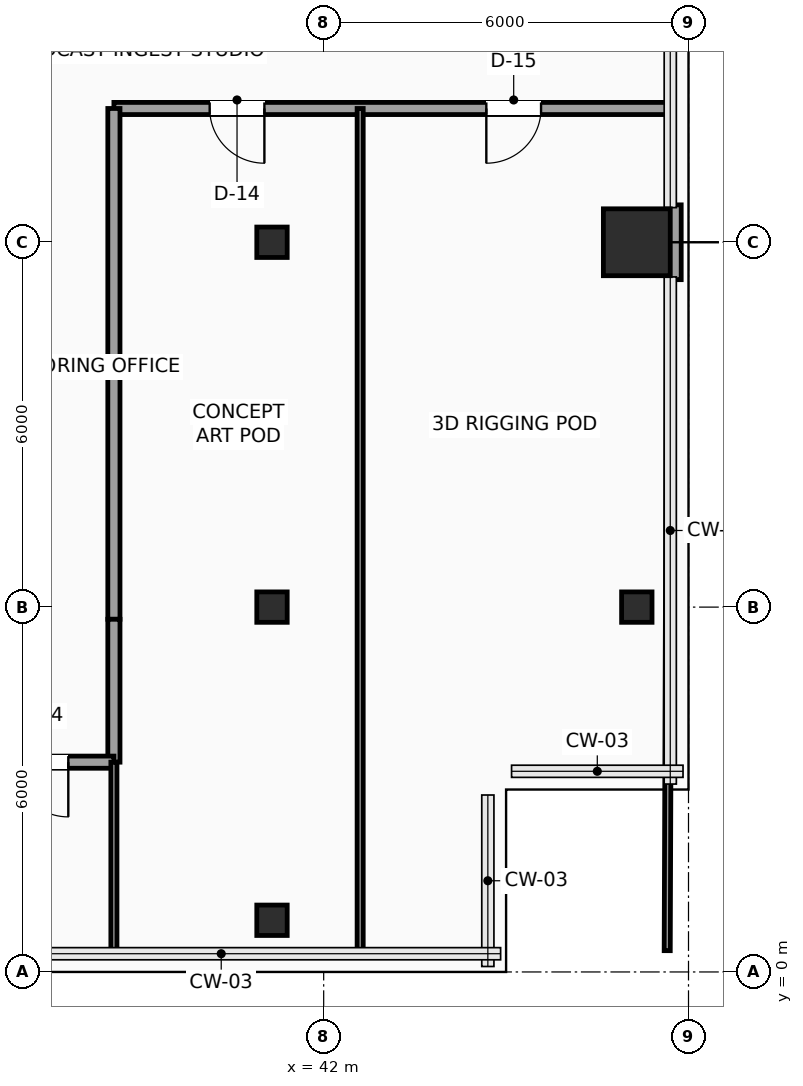
"""IFC4 building model, lengths in metres.
Left out: names, types, materials, properties, quantities, classifications, styles, units other than length and angle.
Written with IfcOpenShell. Run it as: python <this file> out.ifc"""

import sys

from ifc_helpers import new_model, si_unit, direction, frame, frame_2d, origin, origin_2d, place, context, subcontext, project, spatial, rectangle, hollow_rectangle, extrude, element, fill, save


model = new_model("IFC4")
c1 = context("Model", 3, precision=1e-05, world=origin(), true_north=direction((0.0, 1.0)))
c2 = subcontext(c1, "Body", "Model", "MODEL_VIEW")
j1 = project(units=[si_unit("LENGTHUNIT", "METRE"), si_unit("PLANEANGLEUNIT", "RADIAN")], contexts=[c1])
p1 = place(None, origin())
s1 = spatial("IfcSite", under=j1, at=p1, CompositionType="ELEMENT")
p2 = place(p1, origin())
s2 = spatial("IfcBuilding", under=s1, at=p2, CompositionType="ELEMENT")
p3 = place(p2, frame((0.0, 0.0, 145.65)))
s3 = spatial("IfcBuildingStorey", under=s2, at=p3, CompositionType="ELEMENT", Elevation=145.65)
for number, where, z_axis, x_axis in (
    (1, (41.15, 0.85, 0.0), (0.0, 0.0, 1.0), (1.0, 0.0, 0.0)),
    (2, (41.15, 6.0, 0.0), (0.0, 0.0, 1.0), (1.0, 0.0, 0.0)),
    (3, (41.15, 12.0, 0.0), (0.0, 0.0, 1.0), (1.0, 0.0, 0.0)),
    (4, (47.15, 6.0, 0.0), (0.0, 0.0, 1.0), (1.0, 0.0, 0.0)),
):
    element("IfcColumn", number, at=place(p3, frame(where, z_axis=z_axis, x_axis=x_axis)), inside=s3, PredefinedType="COLUMN", context=c2, shape_type="SweptSolid", body=[
        extrude(hollow_rectangle(XDim=0.5, YDim=0.5, WallThickness=0.025, InnerFilletRadius=0.025, OuterFilletRadius=0.04, at=origin_2d()), origin(), (0.0, 0.0, 1.0), 3.75),
    ])
p4 = place(p3, frame((47.15, 12.0, 0.0), z_axis=(0.0, 0.0, 1.0), x_axis=(1.0, 0.0, 0.0)))
e5 = element("IfcColumn", 5, at=p4, inside=s3, PredefinedType="COLUMN", context=c2, shape_type="SweptSolid", body=[
    extrude(rectangle(XDim=1.1, YDim=1.1, at=origin_2d()), origin(), (0.0, 0.0, 1.0), 3.75),
])
p5 = place(p3, frame((47.76, 12.615, 0.0), z_axis=(0.0, 0.0, 1.0), x_axis=(0.0, -1.0, 0.0)))
e6 = element("IfcWall", 6, at=p5, inside=s3, PredefinedType="SOLIDWALL", context=c2, shape_type="SweptSolid", body=[
    extrude(rectangle(XDim=1.23, YDim=0.24, at=frame_2d((0.615, 0.0))), origin(), (0.0, 0.0, 1.0), 3.525),
])
p6 = place(p3, frame((47.7, 14.2, 0.0), z_axis=(0.0, 0.0, 1.0), x_axis=(-1.0, 0.0, 0.0)))
e7 = element("IfcWall", 7, at=p6, inside=s3, PredefinedType="PARTITIONING", context=c2, shape_type="SweptSolid", body=[
    extrude(rectangle(XDim=9.15, YDim=0.2, at=frame_2d((4.575, 0.0))), origin(), (0.0, 0.0, 1.0), 3.525),
])
p7 = place(p6, frame((6.675, 0.0, 0.0)))
e8 = element("IfcOpeningElement", 8, at=p7, cuts=e7, PredefinedType="OPENING", context=c2, shape_type="SweptSolid", body=[
    extrude(rectangle(XDim=0.9, YDim=2.1, at=frame_2d((0.45, 1.05))), frame((0.0, 0.11, 0.0), z_axis=(0.0, -1.0, 0.0), x_axis=(1.0, 0.0, 0.0)), (0.0, 0.0, 1.0), 0.22),
])
p8 = place(p6, frame((2.125, 0.0, 0.0)))
e9 = element("IfcOpeningElement", 9, at=p8, cuts=e7, PredefinedType="OPENING", context=c2, shape_type="SweptSolid", body=[
    extrude(rectangle(XDim=0.9, YDim=2.1, at=frame_2d((0.45, 1.05))), frame((0.0, 0.11, 0.0), z_axis=(0.0, -1.0, 0.0), x_axis=(1.0, 0.0, 0.0)), (0.0, 0.0, 1.0), 0.22),
])
p9 = place(p3, frame((38.55, 14.2, 0.0), z_axis=(0.0, 0.0, 1.0), x_axis=(0.0, -1.0, 0.0)))
e10 = element("IfcWall", 10, at=p9, inside=s3, PredefinedType="PARTITIONING", context=c2, shape_type="SweptSolid", body=[
    extrude(rectangle(XDim=8.4, YDim=0.2, at=frame_2d((4.2, 0.0))), origin(), (0.0, 0.0, 1.0), 3.525),
])
p10 = place(p3, frame((38.55, 5.8, 0.0), z_axis=(0.0, 0.0, 1.0), x_axis=(0.0, -1.0, 0.0)))
e11 = element("IfcWall", 11, at=p10, inside=s3, PredefinedType="PARTITIONING", context=c2, shape_type="SweptSolid", body=[
    extrude(rectangle(XDim=2.35, YDim=0.2, at=frame_2d((1.175, 0.0))), origin(), (0.0, 0.0, 1.0), 3.525),
])
p11 = place(p3, frame((38.55, 3.45, 0.0), z_axis=(0.0, 0.0, 1.0), x_axis=(-1.0, 0.0, 0.0)))
e12 = element("IfcWall", 12, at=p11, inside=s3, PredefinedType="PARTITIONING", context=c2, shape_type="SweptSolid", body=[
    extrude(rectangle(XDim=2.4, YDim=0.2, at=frame_2d((1.2, 0.0))), origin(), (0.0, 0.0, 1.0), 3.067),
])
p12 = place(p11, frame((0.75, 0.0, 0.0)))
e13 = element("IfcOpeningElement", 13, at=p12, cuts=e12, PredefinedType="OPENING", context=c2, shape_type="SweptSolid", body=[
    extrude(rectangle(XDim=0.9, YDim=2.1, at=frame_2d((0.45, 1.05))), frame((0.0, 0.11, 0.0), z_axis=(0.0, -1.0, 0.0), x_axis=(1.0, 0.0, 0.0)), (0.0, 0.0, 1.0), 0.22),
])
p13 = place(p3, frame((38.55, 0.3, 0.0), z_axis=(0.0, 0.0, 1.0), x_axis=(0.0, 1.0, 0.0)))
e14 = element("IfcWall", 14, at=p13, inside=s3, PredefinedType="PARTITIONING", context=c2, shape_type="SweptSolid", body=[
    extrude(rectangle(XDim=3.15, YDim=0.1, at=frame_2d((1.575, 0.0))), origin(), (0.0, 0.0, 1.0), 3.525),
])
p14 = place(p3, frame((42.6, 0.3, 0.0), z_axis=(0.0, 0.0, 1.0), x_axis=(0.0, 1.0, 0.0)))
e15 = element("IfcWall", 15, at=p14, inside=s3, PredefinedType="PARTITIONING", context=c2, shape_type="SweptSolid", body=[
    extrude(rectangle(XDim=13.9, YDim=0.1, at=frame_2d((6.95, 0.0))), origin(), (0.0, 0.0, 1.0), 3.525),
])
p15 = place(p3, frame((47.65, 0.35, 0.0), z_axis=(0.0, 0.0, 1.0), x_axis=(0.003606251025, 0.999993497456, 0.0)))
e16 = element("IfcWall", 16, at=p15, inside=s3, PredefinedType="PARTITIONING", context=c2, shape_type="SweptSolid", body=[
    extrude(rectangle(XDim=11.035, YDim=0.1, at=frame_2d((5.518, 0.0))), origin(), (0.0, 0.0, 1.0), 3.525),
])
p16 = place(p3, frame((47.694, 12.615, 0.0), z_axis=(0.0, 0.0, 1.0), x_axis=(0.003542799701, 0.999993724265, 0.0)))
e17 = element("IfcWall", 17, at=p16, inside=s3, PredefinedType="PARTITIONING", context=c2, shape_type="SweptSolid", body=[
    extrude(rectangle(XDim=1.585, YDim=0.1, at=frame_2d((0.792, 0.0))), origin(), (0.0, 0.0, 1.0), 3.525),
])
p17 = place(p7, origin())
e18 = element("IfcDoor", 18, at=p17, inside=s3, OperationType="SINGLE_SWING_LEFT", PredefinedType="DOOR", context=c2, shape_type="SweptSolid", body=[
    extrude(rectangle(XDim=0.9, YDim=2.1, at=frame_2d((0.45, 1.05))), frame((0.0, 0.025, 0.0), z_axis=(0.0, -1.0, 0.0), x_axis=(1.0, 0.0, 0.0)), (0.0, 0.0, 1.0), 0.05),
])
fill(e8, e18)
p18 = place(p8, origin())
e19 = element("IfcDoor", 19, at=p18, inside=s3, OperationType="SINGLE_SWING_RIGHT", PredefinedType="DOOR", context=c2, shape_type="SweptSolid", body=[
    extrude(rectangle(XDim=0.9, YDim=2.1, at=frame_2d((0.45, 1.05))), frame((0.0, 0.025, 0.0), z_axis=(0.0, -1.0, 0.0), x_axis=(1.0, 0.0, 0.0)), (0.0, 0.0, 1.0), 0.05),
])
fill(e9, e19)
p19 = place(p12, origin())
e20 = element("IfcDoor", 20, at=p19, inside=s3, OperationType="SINGLE_SWING_LEFT", PredefinedType="DOOR", context=c2, shape_type="SweptSolid", body=[
    extrude(rectangle(XDim=0.9, YDim=2.1, at=frame_2d((0.45, 1.05))), frame((0.0, 0.025, 0.0), z_axis=(0.0, -1.0, 0.0), x_axis=(1.0, 0.0, 0.0)), (0.0, 0.0, 1.0), 0.05),
])
fill(e13, e20)
save(model, sys.argv[1])
